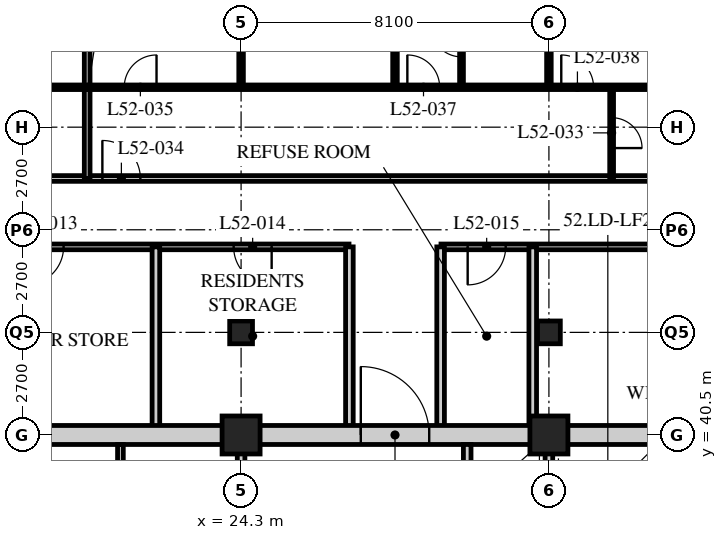
"""IFC4 building model, lengths in metres.
Left out: names, types, materials, properties, quantities, classifications, styles, units other than length and angle.
Written with IfcOpenShell. Run it as: python <this file> out.ifc"""

import sys

from ifc_helpers import new_model, si_unit, direction, frame, frame_2d, origin, origin_2d, place, context, subcontext, project, spatial, rectangle, hollow_rectangle, extrude, element, fill, save


model = new_model("IFC4")
c1 = context("Model", 3, precision=1e-05, world=origin(), true_north=direction((0.0, 1.0)))
c2 = subcontext(c1, "Body", "Model", "MODEL_VIEW")
j1 = project(units=[si_unit("LENGTHUNIT", "METRE"), si_unit("PLANEANGLEUNIT", "RADIAN")], contexts=[c1])
p1 = place(None, origin())
s1 = spatial("IfcSite", under=j1, at=p1, CompositionType="ELEMENT")
p2 = place(p1, origin())
s2 = spatial("IfcBuilding", under=s1, at=p2, CompositionType="ELEMENT")
p3 = place(p2, frame((0.0, 0.0, 202.8)))
s3 = spatial("IfcBuildingStorey", under=s2, at=p3, CompositionType="ELEMENT", Elevation=202.8)
p4 = place(p3, frame((24.3, 40.5, 0.0), z_axis=(0.0, 0.0, 1.0), x_axis=(1.0, 0.0, 0.0)))
e1 = element("IfcColumn", 1, at=p4, inside=s3, PredefinedType="COLUMN", context=c2, shape_type="SweptSolid", body=[
    extrude(hollow_rectangle(XDim=1.0, YDim=1.0, WallThickness=0.1, at=origin_2d()), origin(), (0.0, 0.0, 1.0), 3.6),
])
p5 = place(p3, frame((24.3, 43.2, 0.0), z_axis=(0.0, 0.0, 1.0), x_axis=(1.0, 0.0, 0.0)))
e2 = element("IfcColumn", 2, at=p5, inside=s3, PredefinedType="COLUMN", context=c2, shape_type="SweptSolid", body=[
    extrude(hollow_rectangle(XDim=0.6, YDim=0.6, WallThickness=0.05, at=origin_2d()), origin(), (0.0, 0.0, 1.0), 3.6),
])
p6 = place(p3, frame((32.4, 40.5, 0.0), z_axis=(0.0, 0.0, 1.0), x_axis=(1.0, 0.0, 0.0)))
e3 = element("IfcColumn", 3, at=p6, inside=s3, PredefinedType="COLUMN", context=c2, shape_type="SweptSolid", body=[
    extrude(hollow_rectangle(XDim=1.0, YDim=1.0, WallThickness=0.1, at=origin_2d()), origin(), (0.0, 0.0, 1.0), 3.6),
])
p7 = place(p3, frame((32.4, 43.2, 0.0), z_axis=(0.0, 0.0, 1.0), x_axis=(1.0, 0.0, 0.0)))
e4 = element("IfcColumn", 4, at=p7, inside=s3, PredefinedType="COLUMN", context=c2, shape_type="SweptSolid", body=[
    extrude(hollow_rectangle(XDim=0.6, YDim=0.6, WallThickness=0.05, at=origin_2d()), origin(), (0.0, 0.0, 1.0), 3.6),
])
p8 = place(p3, frame((8.1, 47.25, 0.0), z_axis=(0.0, 0.0, 1.0), x_axis=(1.0, 0.0, 0.0)))
e5 = element("IfcWall", 5, at=p8, inside=s3, PredefinedType="PARTITIONING", context=c2, shape_type="SweptSolid", body=[
    extrude(rectangle(XDim=36.45, YDim=0.15, at=frame_2d((18.225, 0.0))), origin(), (0.0, 0.0, 1.0), 3.39),
])
p9 = place(p8, frame((4.45, 0.0, 0.0)))
e6 = element("IfcOpeningElement", 6, at=p9, cuts=e5, PredefinedType="OPENING", context=c2, shape_type="SweptSolid", body=[
    extrude(rectangle(XDim=1.0, YDim=2.1, at=frame_2d((0.5, 1.05))), frame((0.0, 0.085, 0.0), z_axis=(0.0, -1.0, 0.0), x_axis=(1.0, 0.0, 0.0)), (0.0, 0.0, 1.0), 0.17),
])
p10 = place(p8, frame((12.55, 0.0, 0.0)))
e7 = element("IfcOpeningElement", 7, at=p10, cuts=e5, PredefinedType="OPENING", context=c2, shape_type="SweptSolid", body=[
    extrude(rectangle(XDim=1.0, YDim=2.1, at=frame_2d((0.5, 1.05))), frame((0.0, 0.085, 0.0), z_axis=(0.0, -1.0, 0.0), x_axis=(1.0, 0.0, 0.0)), (0.0, 0.0, 1.0), 0.17),
])
p11 = place(p8, frame((30.7, 0.0, 0.0)))
e8 = element("IfcOpeningElement", 8, at=p11, cuts=e5, PredefinedType="OPENING", context=c2, shape_type="SweptSolid", body=[
    extrude(rectangle(XDim=1.0, YDim=2.1, at=frame_2d((0.5, 1.05))), frame((0.0, 0.085, 0.0), z_axis=(0.0, -1.0, 0.0), x_axis=(1.0, 0.0, 0.0)), (0.0, 0.0, 1.0), 0.17),
])
p12 = place(p8, frame((33.925, 0.0, 0.0)))
e9 = element("IfcOpeningElement", 9, at=p12, cuts=e5, PredefinedType="OPENING", context=c2, shape_type="SweptSolid", body=[
    extrude(rectangle(XDim=1.0, YDim=2.1, at=frame_2d((0.5, 1.05))), frame((0.0, 0.085, 0.0), z_axis=(0.0, -1.0, 0.0), x_axis=(1.0, 0.0, 0.0)), (0.0, 0.0, 1.0), 0.17),
])
p13 = place(p8, frame((1.525, 0.0, 0.0)))
e10 = element("IfcOpeningElement", 10, at=p13, cuts=e5, PredefinedType="OPENING", context=c2, shape_type="SweptSolid", body=[
    extrude(rectangle(XDim=1.0, YDim=2.1, at=frame_2d((0.5, 1.05))), frame((0.0, 0.085, 0.0), z_axis=(0.0, -1.0, 0.0), x_axis=(1.0, 0.0, 0.0)), (0.0, 0.0, 1.0), 0.17),
])
p14 = place(p3, frame((42.75, 45.45, 0.0), z_axis=(0.0, 0.0, 1.0), x_axis=(-1.0, 0.0, 0.0)))
e11 = element("IfcWall", 11, at=p14, inside=s3, PredefinedType="PARTITIONING", context=c2, shape_type="SweptSolid", body=[
    extrude(rectangle(XDim=13.19, YDim=0.15, at=frame_2d((6.595, 0.0))), origin(), (0.0, 0.0, 1.0), 3.39),
])
p15 = place(p14, frame((11.488, 0.0, 0.0)))
e12 = element("IfcOpeningElement", 12, at=p15, cuts=e11, PredefinedType="OPENING", context=c2, shape_type="SweptSolid", body=[
    extrude(rectangle(XDim=1.0, YDim=2.1, at=frame_2d((0.5, 1.05))), frame((0.0, 0.085, 0.0), z_axis=(0.0, -1.0, 0.0), x_axis=(1.0, 0.0, 0.0)), (0.0, 0.0, 1.0), 0.17),
])
p16 = place(p14, frame((4.888, 0.0, 0.0)))
e13 = element("IfcOpeningElement", 13, at=p16, cuts=e11, PredefinedType="OPENING", context=c2, shape_type="SweptSolid", body=[
    extrude(rectangle(XDim=1.0, YDim=2.1, at=frame_2d((0.5, 1.05))), frame((0.0, 0.085, 0.0), z_axis=(0.0, -1.0, 0.0), x_axis=(1.0, 0.0, 0.0)), (0.0, 0.0, 1.0), 0.17),
])
p17 = place(p3, frame((27.14, 45.45, 0.0), z_axis=(0.0, 0.0, 1.0), x_axis=(-1.0, 0.0, 0.0)))
e14 = element("IfcWall", 14, at=p17, inside=s3, PredefinedType="PARTITIONING", context=c2, shape_type="SweptSolid", body=[
    extrude(rectangle(XDim=17.24, YDim=0.15, at=frame_2d((8.62, 0.0))), origin(), (0.0, 0.0, 1.0), 3.39),
])
p18 = place(p17, frame((15.94, 0.0, 0.0)))
e15 = element("IfcOpeningElement", 15, at=p18, cuts=e14, PredefinedType="OPENING", context=c2, shape_type="SweptSolid", body=[
    extrude(rectangle(XDim=1.0, YDim=2.1, at=frame_2d((0.5, 1.05))), frame((0.0, 0.085, 0.0), z_axis=(0.0, -1.0, 0.0), x_axis=(1.0, 0.0, 0.0)), (0.0, 0.0, 1.0), 0.17),
])
p19 = place(p17, frame((12.79, 0.0, 0.0)))
e16 = element("IfcOpeningElement", 16, at=p19, cuts=e14, PredefinedType="OPENING", context=c2, shape_type="SweptSolid", body=[
    extrude(rectangle(XDim=1.0, YDim=2.1, at=frame_2d((0.5, 1.05))), frame((0.0, 0.085, 0.0), z_axis=(0.0, -1.0, 0.0), x_axis=(1.0, 0.0, 0.0)), (0.0, 0.0, 1.0), 0.17),
])
p20 = place(p17, frame((7.511, 0.0, 0.0)))
e17 = element("IfcOpeningElement", 17, at=p20, cuts=e14, PredefinedType="OPENING", context=c2, shape_type="SweptSolid", body=[
    extrude(rectangle(XDim=1.0, YDim=2.1, at=frame_2d((0.5, 1.05))), frame((0.0, 0.085, 0.0), z_axis=(0.0, -1.0, 0.0), x_axis=(1.0, 0.0, 0.0)), (0.0, 0.0, 1.0), 0.17),
])
p21 = place(p17, frame((2.036, 0.0, 0.0)))
e18 = element("IfcOpeningElement", 18, at=p21, cuts=e14, PredefinedType="OPENING", context=c2, shape_type="SweptSolid", body=[
    extrude(rectangle(XDim=1.0, YDim=2.1, at=frame_2d((0.5, 1.05))), frame((0.0, 0.085, 0.0), z_axis=(0.0, -1.0, 0.0), x_axis=(1.0, 0.0, 0.0)), (0.0, 0.0, 1.0), 0.17),
])
p22 = place(p3, frame((22.059, 45.45, 0.0), z_axis=(0.0, 0.0, 1.0), x_axis=(0.0, -1.0, 0.0)))
e19 = element("IfcWall", 19, at=p22, inside=s3, PredefinedType="SOLIDWALL", context=c2, shape_type="SweptSolid", body=[
    extrude(rectangle(XDim=4.95, YDim=0.2, at=frame_2d((2.475, 0.0))), origin(), (0.0, 0.0, 1.0), 3.39),
])
p23 = place(p3, frame((31.974, 45.45, 0.0), z_axis=(0.0, 0.0, 1.0), x_axis=(0.0, -1.0, 0.0)))
e20 = element("IfcWall", 20, at=p23, inside=s3, PredefinedType="SOLIDWALL", context=c2, shape_type="SweptSolid", body=[
    extrude(rectangle(XDim=4.95, YDim=0.2, at=frame_2d((2.475, 0.0))), origin(), (0.0, 0.0, 1.0), 2.69),
])
for number, where, z_axis, x_axis in (
    (21, (27.15, 40.5, 0.0), (0.0, 0.0, 1.0), (0.0, 1.0, 0.0)),
    (22, (29.55, 40.5, 0.0), (0.0, 0.0, 1.0), (0.0, 1.0, 0.0)),
):
    element("IfcWall", number, at=place(p3, frame(where, z_axis=z_axis, x_axis=x_axis)), inside=s3, PredefinedType="SOLIDWALL", context=c2, shape_type="SweptSolid", body=[
        extrude(rectangle(XDim=4.95, YDim=0.2, at=frame_2d((2.475, 0.0))), origin(), (0.0, 0.0, 1.0), 3.39),
    ])
p24 = place(p3, frame((20.25, 47.25, 0.0), z_axis=(0.0, 0.0, 1.0), x_axis=(0.0, 1.0, 0.0)))
e23 = element("IfcWall", 23, at=p24, inside=s3, PredefinedType="PARTITIONING", context=c2, shape_type="SweptSolid", body=[
    extrude(rectangle(XDim=11.85, YDim=0.15, at=frame_2d((5.925, 0.0))), origin(), (0.0, 0.0, 1.0), 3.39),
])
p25 = place(p3, frame((34.05, 47.25, 0.0), z_axis=(0.0, 0.0, 1.0), x_axis=(0.0, 1.0, 0.0)))
e24 = element("IfcWall", 24, at=p25, inside=s3, PredefinedType="PARTITIONING", context=c2, shape_type="SweptSolid", body=[
    extrude(rectangle(XDim=2.4, YDim=0.1, at=frame_2d((1.2, 0.0))), origin(), (0.0, 0.0, 1.0), 3.39),
])
p26 = place(p25, frame((0.8, 0.0, 0.0)))
e25 = element("IfcOpeningElement", 25, at=p26, cuts=e24, PredefinedType="OPENING", context=c2, shape_type="SweptSolid", body=[
    extrude(rectangle(XDim=0.8, YDim=2.1, at=frame_2d((0.4, 1.05))), frame((0.0, 0.06, 0.0), z_axis=(0.0, -1.0, 0.0), x_axis=(1.0, 0.0, 0.0)), (0.0, 0.0, 1.0), 0.12),
])
p27 = place(p3, frame((30.1, 49.65, 0.0), z_axis=(0.0, 0.0, 1.0), x_axis=(0.0, 1.0, 0.0)))
e26 = element("IfcWall", 26, at=p27, inside=s3, PredefinedType="PARTITIONING", context=c2, shape_type="SweptSolid", body=[
    extrude(rectangle(XDim=2.4, YDim=0.1, at=frame_2d((1.2, 0.0))), origin(), (0.0, 0.0, 1.0), 3.39),
])
p28 = place(p27, frame((0.8, 0.0, 0.0)))
e27 = element("IfcOpeningElement", 27, at=p28, cuts=e26, PredefinedType="OPENING", context=c2, shape_type="SweptSolid", body=[
    extrude(rectangle(XDim=0.8, YDim=2.1, at=frame_2d((0.4, 1.05))), frame((0.0, 0.06, 0.0), z_axis=(0.0, -1.0, 0.0), x_axis=(1.0, 0.0, 0.0)), (0.0, 0.0, 1.0), 0.12),
])
p29 = place(p3, frame((28.35, 49.65, 0.0), z_axis=(0.0, 0.0, 1.0), x_axis=(0.0, 1.0, 0.0)))
e28 = element("IfcWall", 28, at=p29, inside=s3, PredefinedType="PARTITIONING", context=c2, shape_type="SweptSolid", body=[
    extrude(rectangle(XDim=9.45, YDim=0.12, at=frame_2d((4.725, 0.0))), origin(), (0.0, 0.0, 1.0), 3.39),
])
p30 = place(p3, frame((32.4, 49.65, 0.0), z_axis=(0.0, 0.0, 1.0), x_axis=(0.0, 1.0, 0.0)))
e29 = element("IfcWall", 29, at=p30, inside=s3, PredefinedType="PARTITIONING", context=c2, shape_type="SweptSolid", body=[
    extrude(rectangle(XDim=9.45, YDim=0.12, at=frame_2d((4.725, 0.0))), origin(), (0.0, 0.0, 1.0), 2.778),
])
p31 = place(p3, frame((4.1, 49.65, 0.0), z_axis=(0.0, 0.0, 1.0), x_axis=(1.0, 0.0, 0.0)))
e30 = element("IfcWall", 30, at=p31, inside=s3, PredefinedType="PARTITIONING", context=c2, shape_type="SweptSolid", body=[
    extrude(rectangle(XDim=32.35, YDim=0.12, at=frame_2d((16.175, 0.0))), origin(), (0.0, 0.0, 1.0), 3.39),
])
p32 = place(p31, frame((9.025, 0.0, 0.0)))
e31 = element("IfcOpeningElement", 31, at=p32, cuts=e30, PredefinedType="OPENING", context=c2, shape_type="SweptSolid", body=[
    extrude(rectangle(XDim=0.85, YDim=2.1, at=frame_2d((0.425, 1.05))), frame((0.0, 0.07, 0.0), z_axis=(0.0, -1.0, 0.0), x_axis=(1.0, 0.0, 0.0)), (0.0, 0.0, 1.0), 0.14),
])
p33 = place(p31, frame((12.425, 0.0, 0.0)))
e32 = element("IfcOpeningElement", 32, at=p33, cuts=e30, PredefinedType="OPENING", context=c2, shape_type="SweptSolid", body=[
    extrude(rectangle(XDim=0.85, YDim=2.1, at=frame_2d((0.425, 1.05))), frame((0.0, 0.07, 0.0), z_axis=(0.0, -1.0, 0.0), x_axis=(1.0, 0.0, 0.0)), (0.0, 0.0, 1.0), 0.14),
])
p34 = place(p31, frame((17.125, 0.0, 0.0)))
e33 = element("IfcOpeningElement", 33, at=p34, cuts=e30, PredefinedType="OPENING", context=c2, shape_type="SweptSolid", body=[
    extrude(rectangle(XDim=0.85, YDim=2.1, at=frame_2d((0.425, 1.05))), frame((0.0, 0.07, 0.0), z_axis=(0.0, -1.0, 0.0), x_axis=(1.0, 0.0, 0.0)), (0.0, 0.0, 1.0), 0.14),
])
p35 = place(p31, frame((24.575, 0.0, 0.0)))
e34 = element("IfcOpeningElement", 34, at=p35, cuts=e30, PredefinedType="OPENING", context=c2, shape_type="SweptSolid", body=[
    extrude(rectangle(XDim=0.85, YDim=2.1, at=frame_2d((0.425, 1.05))), frame((0.0, 0.07, 0.0), z_axis=(0.0, -1.0, 0.0), x_axis=(1.0, 0.0, 0.0)), (0.0, 0.0, 1.0), 0.14),
])
p36 = place(p31, frame((28.625, 0.0, 0.0)))
e35 = element("IfcOpeningElement", 35, at=p36, cuts=e30, PredefinedType="OPENING", context=c2, shape_type="SweptSolid", body=[
    extrude(rectangle(XDim=0.85, YDim=2.1, at=frame_2d((0.425, 1.05))), frame((0.0, 0.07, 0.0), z_axis=(0.0, -1.0, 0.0), x_axis=(1.0, 0.0, 0.0)), (0.0, 0.0, 1.0), 0.14),
])
p37 = place(p31, frame((6.725, 0.0, 0.0)))
e36 = element("IfcOpeningElement", 36, at=p37, cuts=e30, PredefinedType="OPENING", context=c2, shape_type="SweptSolid", body=[
    extrude(rectangle(XDim=0.85, YDim=2.1, at=frame_2d((0.425, 1.05))), frame((0.0, 0.07, 0.0), z_axis=(0.0, -1.0, 0.0), x_axis=(1.0, 0.0, 0.0)), (0.0, 0.0, 1.0), 0.14),
])
p38 = place(p31, frame((2.875, 0.0, 0.0)))
e37 = element("IfcOpeningElement", 37, at=p38, cuts=e30, PredefinedType="OPENING", context=c2, shape_type="SweptSolid", body=[
    extrude(rectangle(XDim=0.85, YDim=2.1, at=frame_2d((0.425, 1.05))), frame((0.0, 0.07, 0.0), z_axis=(0.0, -1.0, 0.0), x_axis=(1.0, 0.0, 0.0)), (0.0, 0.0, 1.0), 0.14),
])
p39 = place(p3, frame((24.3, 49.65, 0.0), z_axis=(0.0, 0.0, 1.0), x_axis=(0.0, 1.0, 0.0)))
e38 = element("IfcWall", 38, at=p39, inside=s3, PredefinedType="PARTITIONING", context=c2, shape_type="SweptSolid", body=[
    extrude(rectangle(XDim=1.35, YDim=0.12, at=frame_2d((0.675, 0.0))), origin(), (0.0, 0.0, 1.0), 2.778),
])
p40 = place(p3, frame((15.95, 40.5, 0.0), z_axis=(0.0, 0.0, 1.0), x_axis=(1.0, 0.0, 0.0)))
e39 = element("IfcWall", 39, at=p40, inside=s3, PredefinedType="SOLIDWALL", context=c2, shape_type="SweptSolid", body=[
    extrude(rectangle(XDim=24.8, YDim=0.5, at=frame_2d((12.4, 0.0))), origin(), (0.0, 0.0, 1.0), 2.74),
])
p41 = place(p40, frame((11.5, 0.0, 0.0)))
e40 = element("IfcOpeningElement", 40, at=p41, cuts=e39, PredefinedType="OPENING", context=c2, shape_type="SweptSolid", body=[
    extrude(rectangle(XDim=1.8, YDim=2.4, at=frame_2d((0.9, 1.2))), frame((0.0, 0.26, 0.0), z_axis=(0.0, -1.0, 0.0), x_axis=(1.0, 0.0, 0.0)), (0.0, 0.0, 1.0), 0.52),
])
p42 = place(p3, frame((32.4, 32.5, 0.0), z_axis=(0.0, 0.0, 1.0), x_axis=(0.0, 1.0, 0.0)))
e41 = element("IfcWall", 41, at=p42, inside=s3, PredefinedType="SOLIDWALL", context=c2, shape_type="SweptSolid", body=[
    extrude(rectangle(XDim=7.75, YDim=0.2, at=frame_2d((3.875, 0.0))), origin(), (0.0, 0.0, 1.0), 2.778),
])
p43 = place(p42, frame((1.9, 0.0, 0.0)))
e42 = element("IfcOpeningElement", 42, at=p43, cuts=e41, PredefinedType="OPENING", context=c2, shape_type="SweptSolid", body=[
    extrude(rectangle(XDim=1.2, YDim=2.1, at=frame_2d((0.6, 1.05))), frame((0.0, 0.11, 0.0), z_axis=(0.0, -1.0, 0.0), x_axis=(1.0, 0.0, 0.0)), (0.0, 0.0, 1.0), 0.22),
])
p44 = place(p3, frame((30.25, 38.65, 0.0), z_axis=(0.0, 0.0, 1.0), x_axis=(0.0, 1.0, 0.0)))
e43 = element("IfcWall", 43, at=p44, inside=s3, PredefinedType="SOLIDWALL", context=c2, shape_type="SweptSolid", body=[
    extrude(rectangle(XDim=1.6, YDim=0.2, at=frame_2d((0.8, 0.0))), origin(), (0.0, 0.0, 1.0), 3.39),
])
p45 = place(p3, frame((24.3, 32.5, 0.0), z_axis=(0.0, 0.0, 1.0), x_axis=(0.0, 1.0, 0.0)))
e44 = element("IfcWall", 44, at=p45, inside=s3, PredefinedType="PARTITIONING", context=c2, shape_type="SweptSolid", body=[
    extrude(rectangle(XDim=7.75, YDim=0.2, at=frame_2d((3.875, 0.0))), origin(), (0.0, 0.0, 1.0), 2.778),
])
p46 = place(p45, frame((0.8, 0.0, 0.0)))
e45 = element("IfcOpeningElement", 45, at=p46, cuts=e44, PredefinedType="OPENING", context=c2, shape_type="SweptSolid", body=[
    extrude(rectangle(XDim=0.9, YDim=2.1, at=frame_2d((0.45, 1.05))), frame((0.0, 0.11, 0.0), z_axis=(0.0, -1.0, 0.0), x_axis=(1.0, 0.0, 0.0)), (0.0, 0.0, 1.0), 0.22),
])
p47 = place(p45, frame((2.65, 0.0, 0.0)))
e46 = element("IfcOpeningElement", 46, at=p47, cuts=e44, PredefinedType="OPENING", context=c2, shape_type="SweptSolid", body=[
    extrude(rectangle(XDim=0.9, YDim=2.1, at=frame_2d((0.45, 1.05))), frame((0.0, 0.11, 0.0), z_axis=(0.0, -1.0, 0.0), x_axis=(1.0, 0.0, 0.0)), (0.0, 0.0, 1.0), 0.22),
])
p48 = place(p45, frame((4.3, 0.0, 0.0)))
e47 = element("IfcOpeningElement", 47, at=p48, cuts=e44, PredefinedType="OPENING", context=c2, shape_type="SweptSolid", body=[
    extrude(rectangle(XDim=0.9, YDim=2.1, at=frame_2d((0.45, 1.05))), frame((0.0, 0.11, 0.0), z_axis=(0.0, -1.0, 0.0), x_axis=(1.0, 0.0, 0.0)), (0.0, 0.0, 1.0), 0.22),
])
p49 = place(p45, frame((6.2, 0.0, 0.0)))
e48 = element("IfcOpeningElement", 48, at=p49, cuts=e44, PredefinedType="OPENING", context=c2, shape_type="SweptSolid", body=[
    extrude(rectangle(XDim=0.9, YDim=2.1, at=frame_2d((0.45, 1.05))), frame((0.0, 0.11, 0.0), z_axis=(0.0, -1.0, 0.0), x_axis=(1.0, 0.0, 0.0)), (0.0, 0.0, 1.0), 0.22),
])
p50 = place(p3, frame((21.125, 36.5, 0.0), z_axis=(0.0, 0.0, 1.0), x_axis=(0.0, 1.0, 0.0)))
e49 = element("IfcWall", 49, at=p50, inside=s3, PredefinedType="PARTITIONING", context=c2, shape_type="SweptSolid", body=[
    extrude(rectangle(XDim=3.75, YDim=0.15, at=frame_2d((1.875, 0.0))), origin(), (0.0, 0.0, 1.0), 3.39),
])
p51 = place(p20, origin())
e50 = element("IfcDoor", 50, at=p51, inside=s3, OperationType="SINGLE_SWING_RIGHT", PredefinedType="DOOR", context=c2, shape_type="SweptSolid", body=[
    extrude(rectangle(XDim=1.0, YDim=2.1, at=frame_2d((0.5, 1.05))), frame((0.0, 0.025, 0.0), z_axis=(0.0, -1.0, 0.0), x_axis=(1.0, 0.0, 0.0)), (0.0, 0.0, 1.0), 0.05),
])
fill(e17, e50)
p52 = place(p21, origin())
e51 = element("IfcDoor", 51, at=p52, inside=s3, OperationType="SINGLE_SWING_LEFT", PredefinedType="DOOR", context=c2, shape_type="SweptSolid", body=[
    extrude(rectangle(XDim=1.0, YDim=2.1, at=frame_2d((0.5, 1.05))), frame((0.0, 0.025, 0.0), z_axis=(0.0, -1.0, 0.0), x_axis=(1.0, 0.0, 0.0)), (0.0, 0.0, 1.0), 0.05),
])
fill(e18, e51)
p53 = place(p15, origin())
e52 = element("IfcDoor", 52, at=p53, inside=s3, OperationType="SINGLE_SWING_RIGHT", PredefinedType="DOOR", context=c2, shape_type="SweptSolid", body=[
    extrude(rectangle(XDim=1.0, YDim=2.1, at=frame_2d((0.5, 1.05))), frame((0.0, 0.025, 0.0), z_axis=(0.0, -1.0, 0.0), x_axis=(1.0, 0.0, 0.0)), (0.0, 0.0, 1.0), 0.05),
])
fill(e12, e52)
p54 = place(p26, origin())
e53 = element("IfcDoor", 53, at=p54, inside=s3, OperationType="SINGLE_SWING_RIGHT", PredefinedType="DOOR", context=c2, shape_type="SweptSolid", body=[
    extrude(rectangle(XDim=0.8, YDim=2.1, at=frame_2d((0.4, 1.05))), frame((0.0, 0.025, 0.0), z_axis=(0.0, -1.0, 0.0), x_axis=(1.0, 0.0, 0.0)), (0.0, 0.0, 1.0), 0.05),
])
fill(e25, e53)
p55 = place(p10, origin())
e54 = element("IfcDoor", 54, at=p55, inside=s3, OperationType="SINGLE_SWING_LEFT", PredefinedType="DOOR", context=c2, shape_type="SweptSolid", body=[
    extrude(rectangle(XDim=1.0, YDim=2.1, at=frame_2d((0.5, 1.05))), frame((0.0, 0.025, 0.0), z_axis=(0.0, -1.0, 0.0), x_axis=(1.0, 0.0, 0.0)), (0.0, 0.0, 1.0), 0.05),
])
fill(e7, e54)
p56 = place(p34, origin())
e55 = element("IfcDoor", 55, at=p56, inside=s3, OperationType="SINGLE_SWING_RIGHT", PredefinedType="DOOR", context=c2, shape_type="SweptSolid", body=[
    extrude(rectangle(XDim=0.85, YDim=2.1, at=frame_2d((0.425, 1.05))), frame((0.0, 0.025, 0.0), z_axis=(0.0, -1.0, 0.0), x_axis=(1.0, 0.0, 0.0)), (0.0, 0.0, 1.0), 0.05),
])
fill(e33, e55)
p57 = place(p28, origin())
e56 = element("IfcDoor", 56, at=p57, inside=s3, OperationType="SINGLE_SWING_RIGHT", PredefinedType="DOOR", context=c2, shape_type="SweptSolid", body=[
    extrude(rectangle(XDim=0.8, YDim=2.1, at=frame_2d((0.4, 1.05))), frame((0.0, 0.025, 0.0), z_axis=(0.0, -1.0, 0.0), x_axis=(1.0, 0.0, 0.0)), (0.0, 0.0, 1.0), 0.05),
])
fill(e27, e56)
p58 = place(p35, origin())
e57 = element("IfcDoor", 57, at=p58, inside=s3, OperationType="SINGLE_SWING_LEFT", PredefinedType="DOOR", context=c2, shape_type="SweptSolid", body=[
    extrude(rectangle(XDim=0.85, YDim=2.1, at=frame_2d((0.425, 1.05))), frame((0.0, 0.025, 0.0), z_axis=(0.0, -1.0, 0.0), x_axis=(1.0, 0.0, 0.0)), (0.0, 0.0, 1.0), 0.05),
])
fill(e34, e57)
p59 = place(p36, origin())
e58 = element("IfcDoor", 58, at=p59, inside=s3, OperationType="SINGLE_SWING_LEFT", PredefinedType="DOOR", context=c2, shape_type="SweptSolid", body=[
    extrude(rectangle(XDim=0.85, YDim=2.1, at=frame_2d((0.425, 1.05))), frame((0.0, 0.025, 0.0), z_axis=(0.0, -1.0, 0.0), x_axis=(1.0, 0.0, 0.0)), (0.0, 0.0, 1.0), 0.05),
])
fill(e35, e58)
p60 = place(p41, origin())
e59 = element("IfcDoor", 59, at=p60, inside=s3, OperationType="DOUBLE_DOOR_SINGLE_SWING", PredefinedType="DOOR", context=c2, shape_type="SweptSolid", body=[
    extrude(rectangle(XDim=1.8, YDim=2.4, at=frame_2d((0.9, 1.2))), frame((0.0, 0.025, 0.0), z_axis=(0.0, -1.0, 0.0), x_axis=(1.0, 0.0, 0.0)), (0.0, 0.0, 1.0), 0.05),
])
fill(e40, e59)
save(model, sys.argv[1])
